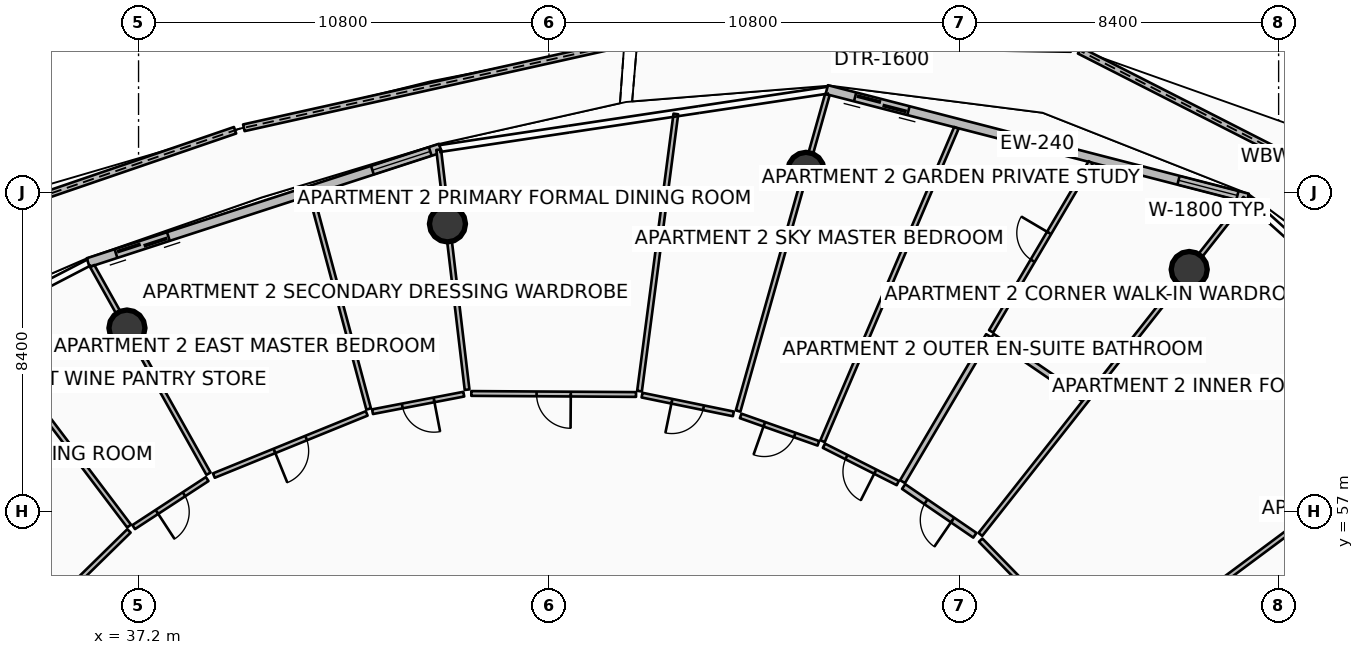
"""IFC4 building model, lengths in metres.
Left out: names, types, materials, properties, quantities, classifications, styles, units other than length and angle.
Written with IfcOpenShell. Run it as: python <this file> out.ifc"""

import sys

from ifc_helpers import new_model, si_unit, direction, frame, frame_2d, origin, origin_2d, place, context, subcontext, project, spatial, polyline, rectangle, circle, outline, extrude, element, fill, save


model = new_model("IFC4")
c1 = context("Model", 3, precision=1e-05, world=origin(), true_north=direction((0.0, 1.0)))
c2 = subcontext(c1, "Body", "Model", "MODEL_VIEW")
j1 = project(units=[si_unit("LENGTHUNIT", "METRE"), si_unit("PLANEANGLEUNIT", "RADIAN")], contexts=[c1])
p1 = place(None, origin())
s1 = spatial("IfcSite", under=j1, at=p1, CompositionType="ELEMENT")
p2 = place(p1, origin())
s2 = spatial("IfcBuilding", under=s1, at=p2, CompositionType="ELEMENT")
p3 = place(p2, frame((0.0, 0.0, 298.3)))
s3 = spatial("IfcBuildingStorey", under=s2, at=p3, CompositionType="ELEMENT", Elevation=298.3)
for number, where, z_axis, x_axis in (
    (1, (64.847, 63.371, 0.0), (0.0, 0.0, 1.0), (1.0, 0.0, 0.0)),
    (2, (54.763, 65.979, 0.0), (0.0, 0.0, 1.0), (1.0, 0.0, 0.0)),
    (3, (45.329, 64.571, 0.0), (0.0, 0.0, 1.0), (1.0, 0.0, 0.0)),
    (4, (36.895, 61.83, 0.0), (0.0, 0.0, 1.0), (1.0, 0.0, 0.0)),
):
    element("IfcColumn", number, at=place(p3, frame(where, z_axis=z_axis, x_axis=x_axis)), inside=s3, PredefinedType="COLUMN", context=c2, shape_type="SweptSolid", body=[
        extrude(circle(Radius=0.475, at=origin_2d()), origin(), (0.0, 0.0, 1.0), 3.59),
    ])
p4 = place(p3, frame((72.917, 63.546, 0.0), z_axis=(0.0, 0.0, 1.0), x_axis=(-0.890886303028, 0.454226369861, 0.0)))
e5 = element("IfcWall", 5, at=p4, inside=s3, PredefinedType="PARAPET", context=c2, shape_type="SweptSolid", body=[
    extrude(outline(polyline([(0.0, 0.0), (12.3, 0.0), (12.3, 1.348), (6.15, 1.562), (0.0, 1.747), (0.0, 0.0)])), frame((0.0, 0.09, 0.0), z_axis=(0.0, -1.0, 0.0), x_axis=(1.0, 0.0, 0.0)), (0.0, 0.0, 1.0), 0.18),
])
p5 = place(p3, frame((49.983, 69.327, 0.0), z_axis=(0.0, 0.0, 1.0), x_axis=(-0.976130464401, -0.217184982143, 0.0)))
e6 = element("IfcWall", 6, at=p5, inside=s3, PredefinedType="PARAPET", context=c2, shape_type="SweptSolid", body=[
    extrude(outline(polyline([(0.0, 0.0), (10.258, 0.0), (10.257, 1.348), (5.129, 1.182), (0.0, 1.12), (0.0, 0.0)])), frame((0.0, 0.09, 0.0), z_axis=(0.0, -1.0, 0.0), x_axis=(1.0, 0.0, 0.0)), (0.0, 0.0, 1.0), 0.18),
])
p6 = place(p3, frame((39.74, 67.034, 0.0), z_axis=(0.0, 0.0, 1.0), x_axis=(-0.945994037051, -0.32418402469, 0.0)))
e7 = element("IfcWall", 7, at=p6, inside=s3, PredefinedType="PARAPET", context=c2, shape_type="SweptSolid", body=[
    extrude(outline(polyline([(0.0, 0.0), (10.544, 0.0), (10.544, 1.747), (5.272, 1.562), (0.0, 1.348), (0.0, 0.0)])), frame((0.0, 0.09, 0.0), z_axis=(0.0, -1.0, 0.0), x_axis=(1.0, 0.0, 0.0)), (0.0, 0.0, 1.0), 0.18),
])
p7 = place(p3, frame((66.386, 65.249, 0.0), z_axis=(0.0, 0.0, 1.0), x_axis=(-0.968343758421, 0.249620442927, 0.0)))
e8 = element("IfcWall", 8, at=p7, inside=s3, PredefinedType="SOLIDWALL", context=c2, shape_type="SweptSolid", body=[
    extrude(rectangle(XDim=11.438, YDim=0.24, at=frame_2d((5.719, 0.0))), origin(), (0.0, 0.0, 1.0), 2.54),
])
p8 = place(p7, frame((9.218, 0.0, 0.0)))
e9 = element("IfcOpeningElement", 9, at=p8, cuts=e8, PredefinedType="OPENING", context=c2, shape_type="SweptSolid", body=[
    extrude(rectangle(XDim=1.45, YDim=2.15, at=frame_2d((0.725, 1.075))), frame((0.0, 0.13, 0.0), z_axis=(0.0, -1.0, 0.0), x_axis=(1.0, 0.0, 0.0)), (0.0, 0.0, 1.0), 0.26),
])
p9 = place(p7, frame((0.28, 0.0, 0.65)))
e10 = element("IfcOpeningElement", 10, at=p9, cuts=e8, PredefinedType="OPENING", context=c2, shape_type="SweptSolid", body=[
    extrude(rectangle(XDim=1.6, YDim=1.5, at=frame_2d((0.8, 0.75))), frame((0.0, 0.13, 0.0), z_axis=(0.0, -1.0, 0.0), x_axis=(1.0, 0.0, 0.0)), (0.0, 0.0, 1.0), 0.26),
])
p10 = place(p3, frame((45.142, 66.564, 0.0), z_axis=(0.0, 0.0, 1.0), x_axis=(-0.951055974609, -0.309018661507, 0.0)))
e11 = element("IfcWall", 11, at=p10, inside=s3, PredefinedType="SOLIDWALL", context=c2, shape_type="SweptSolid", body=[
    extrude(rectangle(XDim=9.745, YDim=0.24, at=frame_2d((4.873, 0.0))), origin(), (0.0, 0.0, 1.0), 2.54),
])
p11 = place(p10, frame((7.525, 0.0, 0.0)))
e12 = element("IfcOpeningElement", 12, at=p11, cuts=e11, PredefinedType="OPENING", context=c2, shape_type="SweptSolid", body=[
    extrude(rectangle(XDim=1.45, YDim=2.15, at=frame_2d((0.725, 1.075))), frame((0.0, 0.13, 0.0), z_axis=(0.0, -1.0, 0.0), x_axis=(1.0, 0.0, 0.0)), (0.0, 0.0, 1.0), 0.26),
])
p12 = place(p10, frame((0.28, 0.0, 0.65)))
e13 = element("IfcOpeningElement", 13, at=p12, cuts=e11, PredefinedType="OPENING", context=c2, shape_type="SweptSolid", body=[
    extrude(rectangle(XDim=1.6, YDim=1.5, at=frame_2d((0.8, 0.75))), frame((0.0, 0.13, 0.0), z_axis=(0.0, -1.0, 0.0), x_axis=(1.0, 0.0, 0.0)), (0.0, 0.0, 1.0), 0.26),
])
p13 = place(p3, frame((63.998, 50.959, 0.0), z_axis=(0.0, 0.0, 1.0), x_axis=(0.872499131003, 0.488615663276, 0.0)))
e14 = element("IfcWall", 14, at=p13, inside=s3, PredefinedType="PARTITIONING", context=c2, shape_type="SweptSolid", body=[
    extrude(rectangle(XDim=12.094, YDim=0.125, at=frame_2d((6.047, 0.0))), origin(), (0.0, 0.0, 1.0), 2.957),
])
p14 = place(p3, frame((62.707, 52.934, 0.0), z_axis=(0.0, 0.0, 1.0), x_axis=(0.802495582548, 0.59665805952, 0.0)))
e15 = element("IfcWall", 15, at=p14, inside=s3, PredefinedType="PARTITIONING", context=c2, shape_type="SweptSolid", body=[
    extrude(rectangle(XDim=11.812, YDim=0.125, at=frame_2d((5.906, 0.0))), origin(), (0.0, 0.0, 1.0), 3.03),
])
p15 = place(p3, frame((62.579, 52.938, 0.0), z_axis=(0.0, 0.0, 1.0), x_axis=(-0.697017998251, 0.717053631268, 0.0)))
e16 = element("IfcWall", 16, at=p15, inside=s3, PredefinedType="PARTITIONING", context=c2, shape_type="SweptSolid", body=[
    extrude(rectangle(XDim=4.618, YDim=0.125, at=frame_2d((2.309, 0.0))), origin(), (0.0, 0.0, 1.0), 2.957),
])
p16 = place(p15, frame((1.859, 0.0, 0.0)))
e17 = element("IfcOpeningElement", 17, at=p16, cuts=e16, PredefinedType="OPENING", context=c2, shape_type="SweptSolid", body=[
    extrude(rectangle(XDim=0.9, YDim=2.08, at=frame_2d((0.45, 1.04))), frame((0.0, 0.073, 0.0), z_axis=(0.0, -1.0, 0.0), x_axis=(1.0, 0.0, 0.0)), (0.0, 0.0, 1.0), 0.145),
])
p17 = place(p3, frame((59.352, 56.399, 0.0), z_axis=(0.0, 0.0, 1.0), x_axis=(0.619083822168, 0.78532491437, 0.0)))
e18 = element("IfcWall", 18, at=p17, inside=s3, PredefinedType="PARTITIONING", context=c2, shape_type="SweptSolid", body=[
    extrude(rectangle(XDim=11.26, YDim=0.125, at=frame_2d((5.63, 0.0))), origin(), (0.0, 0.0, 1.0), 2.957),
])
p18 = place(p3, frame((59.207, 56.377, 0.0), z_axis=(0.0, 0.0, 1.0), x_axis=(-0.825259809451, 0.56475326197, 0.0)))
e19 = element("IfcWall", 19, at=p18, inside=s3, PredefinedType="PARTITIONING", context=c2, shape_type="SweptSolid", body=[
    extrude(rectangle(XDim=2.272, YDim=0.15, at=frame_2d((1.136, 0.0))), origin(), (0.0, 0.0, 1.0), 2.957),
])
p19 = place(p18, frame((0.711, 0.0, 0.0)))
e20 = element("IfcOpeningElement", 20, at=p19, cuts=e19, PredefinedType="OPENING", context=c2, shape_type="SweptSolid", body=[
    extrude(rectangle(XDim=0.85, YDim=2.06, at=frame_2d((0.425, 1.03))), frame((0.0, 0.085, 0.0), z_axis=(0.0, -1.0, 0.0), x_axis=(1.0, 0.0, 0.0)), (0.0, 0.0, 1.0), 0.17),
])
p20 = place(p3, frame((62.049, 59.982, 0.0), z_axis=(0.0, 0.0, 1.0), x_axis=(-0.825298975811, 0.56469602489, 0.0)))
e21 = element("IfcWall", 21, at=p20, inside=s3, PredefinedType="PARTITIONING", context=c2, shape_type="SweptSolid", body=[
    extrude(rectangle(XDim=2.891, YDim=0.15, at=frame_2d((1.446, 0.0))), origin(), (0.0, 0.0, 1.0), 2.957),
])
p21 = place(p3, frame((57.304, 57.789, 0.0), z_axis=(0.0, 0.0, 1.0), x_axis=(0.507661108654, 0.861556845925, 0.0)))
e22 = element("IfcWall", 22, at=p21, inside=s3, PredefinedType="PARTITIONING", context=c2, shape_type="SweptSolid", body=[
    extrude(rectangle(XDim=4.46, YDim=0.15, at=frame_2d((2.23, 0.0))), origin(), (0.0, 0.0, 1.0), 3.03),
])
p22 = place(p3, frame((59.634, 61.743, 0.0), z_axis=(0.0, 0.0, 1.0), x_axis=(0.507642154879, 0.861568013908, 0.0)))
e23 = element("IfcWall", 23, at=p22, inside=s3, PredefinedType="PARTITIONING", context=c2, shape_type="SweptSolid", body=[
    extrude(rectangle(XDim=5.162, YDim=0.125, at=frame_2d((2.581, 0.0))), origin(), (0.0, 0.0, 1.0), 3.03),
])
p23 = place(p22, frame((2.156, 0.0, 0.0)))
e24 = element("IfcOpeningElement", 24, at=p23, cuts=e23, PredefinedType="OPENING", context=c2, shape_type="SweptSolid", body=[
    extrude(rectangle(XDim=0.85, YDim=2.06, at=frame_2d((0.425, 1.03))), frame((0.0, 0.073, 0.0), z_axis=(0.0, -1.0, 0.0), x_axis=(1.0, 0.0, 0.0)), (0.0, 0.0, 1.0), 0.145),
])
p24 = place(p3, frame((55.199, 58.853, 0.0), z_axis=(0.0, 0.0, 1.0), x_axis=(0.392818008104, 0.919616231104, 0.0)))
e25 = element("IfcWall", 25, at=p24, inside=s3, PredefinedType="PARTITIONING", context=c2, shape_type="SweptSolid", body=[
    extrude(rectangle(XDim=8.965, YDim=0.125, at=frame_2d((4.483, 0.0))), origin(), (0.0, 0.0, 1.0), 3.03),
])
p25 = place(p3, frame((57.178, 57.752, 0.0), z_axis=(0.0, 0.0, 1.0), x_axis=(-0.892467562153, 0.451111572125, 0.0)))
e26 = element("IfcWall", 26, at=p25, inside=s3, PredefinedType="PARTITIONING", context=c2, shape_type="SweptSolid", body=[
    extrude(rectangle(XDim=2.177, YDim=0.125, at=frame_2d((1.089, 0.0))), origin(), (0.0, 0.0, 1.0), 3.03),
])
p26 = place(p25, frame((0.664, 0.0, 0.0)))
e27 = element("IfcOpeningElement", 27, at=p26, cuts=e26, PredefinedType="OPENING", context=c2, shape_type="SweptSolid", body=[
    extrude(rectangle(XDim=0.85, YDim=2.06, at=frame_2d((0.425, 1.03))), frame((0.0, 0.073, 0.0), z_axis=(0.0, -1.0, 0.0), x_axis=(1.0, 0.0, 0.0)), (0.0, 0.0, 1.0), 0.145),
])
p27 = place(p3, frame((55.088, 58.797, 0.0), z_axis=(0.0, 0.0, 1.0), x_axis=(-0.942971615288, 0.332873148152, 0.0)))
e28 = element("IfcWall", 28, at=p27, inside=s3, PredefinedType="PARTITIONING", context=c2, shape_type="SweptSolid", body=[
    extrude(rectangle(XDim=2.167, YDim=0.125, at=frame_2d((1.083, 0.0))), origin(), (0.0, 0.0, 1.0), 2.957),
])
p28 = place(p27, frame((0.659, 0.0, 0.0)))
e29 = element("IfcOpeningElement", 29, at=p28, cuts=e28, PredefinedType="OPENING", context=c2, shape_type="SweptSolid", body=[
    extrude(rectangle(XDim=0.85, YDim=2.06, at=frame_2d((0.425, 1.03))), frame((0.0, 0.073, 0.0), z_axis=(0.0, -1.0, 0.0), x_axis=(1.0, 0.0, 0.0)), (0.0, 0.0, 1.0), 0.145),
])
p29 = place(p3, frame((52.977, 59.647, 0.0), z_axis=(0.0, 0.0, 1.0), x_axis=(0.271446085083, 0.96245364714, 0.0)))
e30 = element("IfcWall", 30, at=p29, inside=s3, PredefinedType="PARTITIONING", context=c2, shape_type="SweptSolid", body=[
    extrude(rectangle(XDim=8.649, YDim=0.125, at=frame_2d((4.324, 0.0))), origin(), (0.0, 0.0, 1.0), 2.957),
])
p30 = place(p3, frame((50.383, 60.17, 0.0), z_axis=(0.0, 0.0, 1.0), x_axis=(0.129989099313, 0.991515423006, 0.0)))
e31 = element("IfcWall", 31, at=p30, inside=s3, PredefinedType="PARTITIONING", context=c2, shape_type="SweptSolid", body=[
    extrude(rectangle(XDim=7.355, YDim=0.125, at=frame_2d((3.677, 0.0))), origin(), (0.0, 0.0, 1.0), 3.03),
])
p31 = place(p3, frame((52.852, 59.571, 0.0), z_axis=(0.0, 0.0, 1.0), x_axis=(-0.979521745736, 0.201338395816, 0.0)))
e32 = element("IfcWall", 32, at=p31, inside=s3, PredefinedType="PARTITIONING", context=c2, shape_type="SweptSolid", body=[
    extrude(rectangle(XDim=2.453, YDim=0.125, at=frame_2d((1.227, 0.0))), origin(), (0.0, 0.0, 1.0), 2.957),
])
p32 = place(p31, frame((0.802, 0.0, 0.0)))
e33 = element("IfcOpeningElement", 33, at=p32, cuts=e32, PredefinedType="OPENING", context=c2, shape_type="SweptSolid", body=[
    extrude(rectangle(XDim=0.85, YDim=2.06, at=frame_2d((0.425, 1.03))), frame((0.0, 0.073, 0.0), z_axis=(0.0, -1.0, 0.0), x_axis=(1.0, 0.0, 0.0)), (0.0, 0.0, 1.0), 0.145),
])
p33 = place(p3, frame((50.291, 60.082, 0.0), z_axis=(0.0, 0.0, 1.0), x_axis=(-0.999980453918, 0.006252342161, 0.0)))
e34 = element("IfcWall", 34, at=p33, inside=s3, PredefinedType="PARTITIONING", context=c2, shape_type="SweptSolid", body=[
    extrude(rectangle(XDim=4.334, YDim=0.125, at=frame_2d((2.167, 0.0))), origin(), (0.0, 0.0, 1.0), 3.03),
])
p34 = place(p33, frame((1.717, 0.0, 0.0)))
e35 = element("IfcOpeningElement", 35, at=p34, cuts=e34, PredefinedType="OPENING", context=c2, shape_type="SweptSolid", body=[
    extrude(rectangle(XDim=0.9, YDim=2.08, at=frame_2d((0.45, 1.04))), frame((0.0, 0.073, 0.0), z_axis=(0.0, -1.0, 0.0), x_axis=(1.0, 0.0, 0.0)), (0.0, 0.0, 1.0), 0.145),
])
p35 = place(p3, frame((45.845, 60.209, 0.0), z_axis=(0.0, 0.0, 1.0), x_axis=(-0.117529592268, 0.993069380729, 0.0)))
e36 = element("IfcWall", 36, at=p35, inside=s3, PredefinedType="PARTITIONING", context=c2, shape_type="SweptSolid", body=[
    extrude(rectangle(XDim=6.359, YDim=0.125, at=frame_2d((3.179, 0.0))), origin(), (0.0, 0.0, 1.0), 2.957),
])
p36 = place(p3, frame((43.255, 59.701, 0.0), z_axis=(0.0, 0.0, 1.0), x_axis=(-0.258974129201, 0.965884258286, 0.0)))
e37 = element("IfcWall", 37, at=p36, inside=s3, PredefinedType="PARTITIONING", context=c2, shape_type="SweptSolid", body=[
    extrude(rectangle(XDim=5.827, YDim=0.125, at=frame_2d((2.914, 0.0))), origin(), (0.0, 0.0, 1.0), 3.03),
])
p37 = place(p3, frame((45.758, 60.091, 0.0), z_axis=(0.0, 0.0, 1.0), x_axis=(-0.982023530452, -0.188758537923, 0.0)))
e38 = element("IfcWall", 38, at=p37, inside=s3, PredefinedType="PARTITIONING", context=c2, shape_type="SweptSolid", body=[
    extrude(rectangle(XDim=2.446, YDim=0.125, at=frame_2d((1.223, 0.0))), origin(), (0.0, 0.0, 1.0), 2.957),
])
p38 = place(p37, frame((0.798, 0.0, 0.0)))
e39 = element("IfcOpeningElement", 39, at=p38, cuts=e38, PredefinedType="OPENING", context=c2, shape_type="SweptSolid", body=[
    extrude(rectangle(XDim=0.85, YDim=2.06, at=frame_2d((0.425, 1.03))), frame((0.0, 0.073, 0.0), z_axis=(0.0, -1.0, 0.0), x_axis=(1.0, 0.0, 0.0)), (0.0, 0.0, 1.0), 0.145),
])
p39 = place(p3, frame((43.204, 59.584, 0.0), z_axis=(0.0, 0.0, 1.0), x_axis=(-0.926332321747, -0.376707352843, 0.0)))
e40 = element("IfcWall", 40, at=p39, inside=s3, PredefinedType="PARTITIONING", context=c2, shape_type="SweptSolid", body=[
    extrude(rectangle(XDim=4.342, YDim=0.125, at=frame_2d((2.171, 0.0))), origin(), (0.0, 0.0, 1.0), 2.957),
])
p40 = place(p39, frame((1.721, 0.0, 0.0)))
e41 = element("IfcOpeningElement", 41, at=p40, cuts=e40, PredefinedType="OPENING", context=c2, shape_type="SweptSolid", body=[
    extrude(rectangle(XDim=0.9, YDim=2.08, at=frame_2d((0.45, 1.04))), frame((0.0, 0.073, 0.0), z_axis=(0.0, -1.0, 0.0), x_axis=(1.0, 0.0, 0.0)), (0.0, 0.0, 1.0), 0.145),
])
p41 = place(p3, frame((39.041, 57.998, 0.0), z_axis=(0.0, 0.0, 1.0), x_axis=(-0.488617622803, 0.872498033629, 0.0)))
e42 = element("IfcWall", 42, at=p41, inside=s3, PredefinedType="PARTITIONING", context=c2, shape_type="SweptSolid", body=[
    extrude(rectangle(XDim=6.259, YDim=0.125, at=frame_2d((3.129, 0.0))), origin(), (0.0, 0.0, 1.0), 2.957),
])
p42 = place(p3, frame((36.951, 56.62, 0.0), z_axis=(0.0, 0.0, 1.0), x_axis=(-0.602918531989, 0.797802759951, 0.0)))
e43 = element("IfcWall", 43, at=p42, inside=s3, PredefinedType="PARTITIONING", context=c2, shape_type="SweptSolid", body=[
    extrude(rectangle(XDim=6.71, YDim=0.125, at=frame_2d((3.355, 0.0))), origin(), (0.0, 0.0, 1.0), 3.03),
])
p43 = place(p3, frame((39.006, 57.856, 0.0), z_axis=(0.0, 0.0, 1.0), x_axis=(-0.837071991575, -0.547092753489, 0.0)))
e44 = element("IfcWall", 44, at=p43, inside=s3, PredefinedType="PARTITIONING", context=c2, shape_type="SweptSolid", body=[
    extrude(rectangle(XDim=2.31, YDim=0.125, at=frame_2d((1.155, 0.0))), origin(), (0.0, 0.0, 1.0), 2.957),
])
p44 = place(p43, frame((0.73, 0.0, 0.0)))
e45 = element("IfcOpeningElement", 45, at=p44, cuts=e44, PredefinedType="OPENING", context=c2, shape_type="SweptSolid", body=[
    extrude(rectangle(XDim=0.85, YDim=2.06, at=frame_2d((0.425, 1.03))), frame((0.0, 0.073, 0.0), z_axis=(0.0, -1.0, 0.0), x_axis=(1.0, 0.0, 0.0)), (0.0, 0.0, 1.0), 0.145),
])
p45 = place(p3, frame((36.948, 56.493, 0.0), z_axis=(0.0, 0.0, 1.0), x_axis=(-0.714296261594, -0.69984344726, 0.0)))
e46 = element("IfcWall", 46, at=p45, inside=s3, PredefinedType="PARTITIONING", context=c2, shape_type="SweptSolid", body=[
    extrude(rectangle(XDim=4.477, YDim=0.125, at=frame_2d((2.238, 0.0))), origin(), (0.0, 0.0, 1.0), 2.957),
])
p46 = place(p45, frame((1.788, 0.0, 0.0)))
e47 = element("IfcOpeningElement", 47, at=p46, cuts=e46, PredefinedType="OPENING", context=c2, shape_type="SweptSolid", body=[
    extrude(rectangle(XDim=0.9, YDim=2.08, at=frame_2d((0.45, 1.04))), frame((0.0, 0.073, 0.0), z_axis=(0.0, -1.0, 0.0), x_axis=(1.0, 0.0, 0.0)), (0.0, 0.0, 1.0), 0.145),
])
p47 = place(p8, origin())
e48 = element("IfcDoor", 48, at=p47, inside=s3, OperationType="DOUBLE_DOOR_SLIDING", PredefinedType="DOOR", context=c2, shape_type="SweptSolid", body=[
    extrude(rectangle(XDim=1.45, YDim=2.15, at=frame_2d((0.725, 1.075))), frame((0.0, 0.025, 0.0), z_axis=(0.0, -1.0, 0.0), x_axis=(1.0, 0.0, 0.0)), (0.0, 0.0, 1.0), 0.05),
])
fill(e9, e48)
p48 = place(p9, origin())
e49 = element("IfcWindow", 49, at=p48, inside=s3, PartitioningType="SINGLE_PANEL", PredefinedType="WINDOW", context=c2, shape_type="SweptSolid", body=[
    extrude(rectangle(XDim=1.6, YDim=1.5, at=frame_2d((0.8, 0.75))), frame((0.0, 0.03, 0.0), z_axis=(0.0, -1.0, 0.0), x_axis=(1.0, 0.0, 0.0)), (0.0, 0.0, 1.0), 0.06),
])
fill(e10, e49)
p49 = place(p11, origin())
e50 = element("IfcDoor", 50, at=p49, inside=s3, OperationType="DOUBLE_DOOR_SLIDING", PredefinedType="DOOR", context=c2, shape_type="SweptSolid", body=[
    extrude(rectangle(XDim=1.45, YDim=2.15, at=frame_2d((0.725, 1.075))), frame((0.0, 0.025, 0.0), z_axis=(0.0, -1.0, 0.0), x_axis=(1.0, 0.0, 0.0)), (0.0, 0.0, 1.0), 0.05),
])
fill(e12, e50)
p50 = place(p12, origin())
e51 = element("IfcWindow", 51, at=p50, inside=s3, PartitioningType="SINGLE_PANEL", PredefinedType="WINDOW", context=c2, shape_type="SweptSolid", body=[
    extrude(rectangle(XDim=1.6, YDim=1.5, at=frame_2d((0.8, 0.75))), frame((0.0, 0.03, 0.0), z_axis=(0.0, -1.0, 0.0), x_axis=(1.0, 0.0, 0.0)), (0.0, 0.0, 1.0), 0.06),
])
fill(e13, e51)
p51 = place(p19, origin())
e52 = element("IfcDoor", 52, at=p51, inside=s3, OperationType="SINGLE_SWING_LEFT", PredefinedType="DOOR", context=c2, shape_type="SweptSolid", body=[
    extrude(rectangle(XDim=0.85, YDim=2.06, at=frame_2d((0.425, 1.03))), frame((0.0, 0.025, 0.0), z_axis=(0.0, -1.0, 0.0), x_axis=(1.0, 0.0, 0.0)), (0.0, 0.0, 1.0), 0.05),
])
fill(e20, e52)
p52 = place(p23, origin())
e53 = element("IfcDoor", 53, at=p52, inside=s3, OperationType="SINGLE_SWING_RIGHT", PredefinedType="DOOR", context=c2, shape_type="SweptSolid", body=[
    extrude(rectangle(XDim=0.85, YDim=2.06, at=frame_2d((0.425, 1.03))), frame((0.0, 0.025, 0.0), z_axis=(0.0, -1.0, 0.0), x_axis=(1.0, 0.0, 0.0)), (0.0, 0.0, 1.0), 0.05),
])
fill(e24, e53)
p53 = place(p26, origin())
e54 = element("IfcDoor", 54, at=p53, inside=s3, OperationType="SINGLE_SWING_LEFT", PredefinedType="DOOR", context=c2, shape_type="SweptSolid", body=[
    extrude(rectangle(XDim=0.85, YDim=2.06, at=frame_2d((0.425, 1.03))), frame((0.0, 0.025, 0.0), z_axis=(0.0, -1.0, 0.0), x_axis=(1.0, 0.0, 0.0)), (0.0, 0.0, 1.0), 0.05),
])
fill(e27, e54)
p54 = place(p28, origin())
e55 = element("IfcDoor", 55, at=p54, inside=s3, OperationType="SINGLE_SWING_RIGHT", PredefinedType="DOOR", context=c2, shape_type="SweptSolid", body=[
    extrude(rectangle(XDim=0.85, YDim=2.06, at=frame_2d((0.425, 1.03))), frame((0.0, 0.025, 0.0), z_axis=(0.0, -1.0, 0.0), x_axis=(1.0, 0.0, 0.0)), (0.0, 0.0, 1.0), 0.05),
])
fill(e29, e55)
p55 = place(p32, origin())
e56 = element("IfcDoor", 56, at=p55, inside=s3, OperationType="SINGLE_SWING_RIGHT", PredefinedType="DOOR", context=c2, shape_type="SweptSolid", body=[
    extrude(rectangle(XDim=0.85, YDim=2.06, at=frame_2d((0.425, 1.03))), frame((0.0, 0.025, 0.0), z_axis=(0.0, -1.0, 0.0), x_axis=(1.0, 0.0, 0.0)), (0.0, 0.0, 1.0), 0.05),
])
fill(e33, e56)
p56 = place(p34, origin())
e57 = element("IfcDoor", 57, at=p56, inside=s3, OperationType="SINGLE_SWING_LEFT", PredefinedType="DOOR", context=c2, shape_type="SweptSolid", body=[
    extrude(rectangle(XDim=0.9, YDim=2.08, at=frame_2d((0.45, 1.04))), frame((0.0, 0.025, 0.0), z_axis=(0.0, -1.0, 0.0), x_axis=(1.0, 0.0, 0.0)), (0.0, 0.0, 1.0), 0.05),
])
fill(e35, e57)
p57 = place(p38, origin())
e58 = element("IfcDoor", 58, at=p57, inside=s3, OperationType="SINGLE_SWING_LEFT", PredefinedType="DOOR", context=c2, shape_type="SweptSolid", body=[
    extrude(rectangle(XDim=0.85, YDim=2.06, at=frame_2d((0.425, 1.03))), frame((0.0, 0.025, 0.0), z_axis=(0.0, -1.0, 0.0), x_axis=(1.0, 0.0, 0.0)), (0.0, 0.0, 1.0), 0.05),
])
fill(e39, e58)
p58 = place(p40, origin())
e59 = element("IfcDoor", 59, at=p58, inside=s3, OperationType="SINGLE_SWING_RIGHT", PredefinedType="DOOR", context=c2, shape_type="SweptSolid", body=[
    extrude(rectangle(XDim=0.9, YDim=2.08, at=frame_2d((0.45, 1.04))), frame((0.0, 0.025, 0.0), z_axis=(0.0, -1.0, 0.0), x_axis=(1.0, 0.0, 0.0)), (0.0, 0.0, 1.0), 0.05),
])
fill(e41, e59)
p59 = place(p44, origin())
e60 = element("IfcDoor", 60, at=p59, inside=s3, OperationType="SINGLE_SWING_RIGHT", PredefinedType="DOOR", context=c2, shape_type="SweptSolid", body=[
    extrude(rectangle(XDim=0.85, YDim=2.06, at=frame_2d((0.425, 1.03))), frame((0.0, 0.025, 0.0), z_axis=(0.0, -1.0, 0.0), x_axis=(1.0, 0.0, 0.0)), (0.0, 0.0, 1.0), 0.05),
])
fill(e45, e60)
save(model, sys.argv[1])
